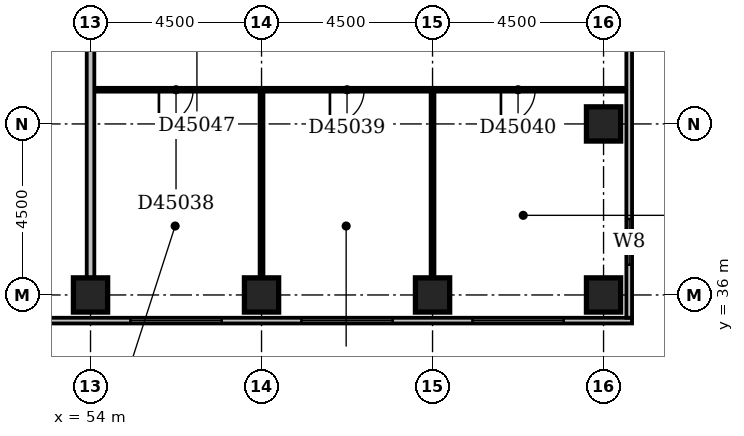
"""IFC4 building model, lengths in metres.
Left out: names, types, materials, properties, quantities, classifications, styles, units other than length and angle.
Written with IfcOpenShell. Run it as: python <this file> out.ifc"""

import sys

from ifc_helpers import new_model, si_unit, direction, frame, frame_2d, origin, origin_2d, place, context, subcontext, project, spatial, rectangle, extrude, element, fill, save


model = new_model("IFC4")
c1 = context("Model", 3, precision=1e-05, world=origin(), true_north=direction((0.0, 1.0)))
c2 = subcontext(c1, "Body", "Model", "MODEL_VIEW")
j1 = project(units=[si_unit("LENGTHUNIT", "METRE"), si_unit("PLANEANGLEUNIT", "RADIAN")], contexts=[c1])
p1 = place(None, origin())
s1 = spatial("IfcSite", under=j1, at=p1, CompositionType="ELEMENT")
p2 = place(p1, origin())
s2 = spatial("IfcBuilding", under=s1, at=p2, CompositionType="ELEMENT")
p3 = place(p2, frame((0.0, 0.0, 179.0)))
s3 = spatial("IfcBuildingStorey", under=s2, at=p3, CompositionType="ELEMENT", Elevation=179.0)
for number, where, z_axis, x_axis in (
    (1, (54.0, 36.0, -0.3), (0.0, 0.0, 1.0), (1.0, 0.0, 0.0)),
    (2, (58.5, 36.0, -0.3), (0.0, 0.0, 1.0), (1.0, 0.0, 0.0)),
    (3, (63.0, 36.0, -0.3), (0.0, 0.0, 1.0), (1.0, 0.0, 0.0)),
    (4, (67.5, 36.0, -0.3), (0.0, 0.0, 1.0), (1.0, 0.0, 0.0)),
    (5, (67.5, 40.5, -0.3), (0.0, 0.0, 1.0), (1.0, 0.0, 0.0)),
):
    element("IfcColumn", number, at=place(p3, frame(where, z_axis=z_axis, x_axis=x_axis)), inside=s3, PredefinedType="COLUMN", context=c2, shape_type="SweptSolid", body=[
        extrude(rectangle(XDim=0.9, YDim=0.9, at=origin_2d()), origin(), (0.0, 0.0, 1.0), 3.6),
    ])
p4 = place(p3, frame((23.1, 35.325, 0.0), z_axis=(0.0, 0.0, 1.0), x_axis=(1.0, 0.0, 0.0)))
e6 = element("IfcWall", 6, at=p4, inside=s3, PredefinedType="STANDARD", context=c2, shape_type="SweptSolid", body=[
    extrude(rectangle(XDim=45.15, YDim=0.15, at=frame_2d((22.575, 0.0))), origin(), (0.0, 0.0, 1.0), 2.7),
])
p5 = place(p4, frame((0.217, 0.0, 0.6)))
e7 = element("IfcOpeningElement", 7, at=p5, cuts=e6, PredefinedType="OPENING", context=c2, shape_type="SweptSolid", body=[
    extrude(rectangle(XDim=2.1, YDim=1.8, at=frame_2d((1.05, 0.9))), frame((0.0, 0.087, 0.0), z_axis=(0.0, -1.0, 0.0), x_axis=(1.0, 0.0, 0.0)), (0.0, 0.0, 1.0), 0.174),
])
p6 = place(p4, frame((4.95, 0.0, 0.6)))
e8 = element("IfcOpeningElement", 8, at=p6, cuts=e6, PredefinedType="OPENING", context=c2, shape_type="SweptSolid", body=[
    extrude(rectangle(XDim=2.4, YDim=1.8, at=frame_2d((1.2, 0.9))), frame((0.0, 0.087, 0.0), z_axis=(0.0, -1.0, 0.0), x_axis=(1.0, 0.0, 0.0)), (0.0, 0.0, 1.0), 0.174),
])
p7 = place(p4, frame((9.45, 0.0, 0.6)))
e9 = element("IfcOpeningElement", 9, at=p7, cuts=e6, PredefinedType="OPENING", context=c2, shape_type="SweptSolid", body=[
    extrude(rectangle(XDim=2.4, YDim=1.8, at=frame_2d((1.2, 0.9))), frame((0.0, 0.087, 0.0), z_axis=(0.0, -1.0, 0.0), x_axis=(1.0, 0.0, 0.0)), (0.0, 0.0, 1.0), 0.174),
])
p8 = place(p4, frame((13.95, 0.0, 0.6)))
e10 = element("IfcOpeningElement", 10, at=p8, cuts=e6, PredefinedType="OPENING", context=c2, shape_type="SweptSolid", body=[
    extrude(rectangle(XDim=2.4, YDim=1.8, at=frame_2d((1.2, 0.9))), frame((0.0, 0.087, 0.0), z_axis=(0.0, -1.0, 0.0), x_axis=(1.0, 0.0, 0.0)), (0.0, 0.0, 1.0), 0.174),
])
p9 = place(p4, frame((18.45, 0.0, 0.6)))
e11 = element("IfcOpeningElement", 11, at=p9, cuts=e6, PredefinedType="OPENING", context=c2, shape_type="SweptSolid", body=[
    extrude(rectangle(XDim=2.4, YDim=1.8, at=frame_2d((1.2, 0.9))), frame((0.0, 0.087, 0.0), z_axis=(0.0, -1.0, 0.0), x_axis=(1.0, 0.0, 0.0)), (0.0, 0.0, 1.0), 0.174),
])
p10 = place(p4, frame((24.403, 0.0, 0.6)))
e12 = element("IfcOpeningElement", 12, at=p10, cuts=e6, PredefinedType="OPENING", context=c2, shape_type="SweptSolid", body=[
    extrude(rectangle(XDim=1.2, YDim=1.8, at=frame_2d((0.6, 0.9))), frame((0.0, 0.087, 0.0), z_axis=(0.0, -1.0, 0.0), x_axis=(1.0, 0.0, 0.0)), (0.0, 0.0, 1.0), 0.174),
])
p11 = place(p4, frame((27.141, 0.0, 0.6)))
e13 = element("IfcOpeningElement", 13, at=p11, cuts=e6, PredefinedType="OPENING", context=c2, shape_type="SweptSolid", body=[
    extrude(rectangle(XDim=2.1, YDim=1.8, at=frame_2d((1.05, 0.9))), frame((0.0, 0.087, 0.0), z_axis=(0.0, -1.0, 0.0), x_axis=(1.0, 0.0, 0.0)), (0.0, 0.0, 1.0), 0.174),
])
p12 = place(p4, frame((31.95, 0.0, 0.6)))
e14 = element("IfcOpeningElement", 14, at=p12, cuts=e6, PredefinedType="OPENING", context=c2, shape_type="SweptSolid", body=[
    extrude(rectangle(XDim=2.4, YDim=1.8, at=frame_2d((1.2, 0.9))), frame((0.0, 0.087, 0.0), z_axis=(0.0, -1.0, 0.0), x_axis=(1.0, 0.0, 0.0)), (0.0, 0.0, 1.0), 0.174),
])
p13 = place(p4, frame((36.45, 0.0, 0.6)))
e15 = element("IfcOpeningElement", 15, at=p13, cuts=e6, PredefinedType="OPENING", context=c2, shape_type="SweptSolid", body=[
    extrude(rectangle(XDim=2.4, YDim=1.8, at=frame_2d((1.2, 0.9))), frame((0.0, 0.087, 0.0), z_axis=(0.0, -1.0, 0.0), x_axis=(1.0, 0.0, 0.0)), (0.0, 0.0, 1.0), 0.174),
])
p14 = place(p4, frame((40.95, 0.0, 0.6)))
e16 = element("IfcOpeningElement", 16, at=p14, cuts=e6, PredefinedType="OPENING", context=c2, shape_type="SweptSolid", body=[
    extrude(rectangle(XDim=2.4, YDim=1.8, at=frame_2d((1.2, 0.9))), frame((0.0, 0.087, 0.0), z_axis=(0.0, -1.0, 0.0), x_axis=(1.0, 0.0, 0.0)), (0.0, 0.0, 1.0), 0.174),
])
p15 = place(p3, frame((68.175, 35.4, 0.0), z_axis=(0.0, 0.0, 1.0), x_axis=(0.0, 1.0, 0.0)))
e17 = element("IfcWall", 17, at=p15, inside=s3, PredefinedType="STANDARD", context=c2, shape_type="SweptSolid", body=[
    extrude(rectangle(XDim=23.85, YDim=0.15, at=frame_2d((11.925, 0.0))), origin(), (0.0, 0.0, 1.0), 2.7),
])
p16 = place(p15, frame((1.397, 0.0, 0.6)))
e18 = element("IfcOpeningElement", 18, at=p16, cuts=e17, PredefinedType="OPENING", context=c2, shape_type="SweptSolid", body=[
    extrude(rectangle(XDim=1.2, YDim=1.8, at=frame_2d((0.6, 0.9))), frame((0.0, 0.087, 0.0), z_axis=(0.0, -1.0, 0.0), x_axis=(1.0, 0.0, 0.0)), (0.0, 0.0, 1.0), 0.174),
])
p17 = place(p15, frame((10.65, 0.0, 0.6)))
e19 = element("IfcOpeningElement", 19, at=p17, cuts=e17, PredefinedType="OPENING", context=c2, shape_type="SweptSolid", body=[
    extrude(rectangle(XDim=2.4, YDim=1.8, at=frame_2d((1.2, 0.9))), frame((0.0, 0.087, 0.0), z_axis=(0.0, -1.0, 0.0), x_axis=(1.0, 0.0, 0.0)), (0.0, 0.0, 1.0), 0.174),
])
p18 = place(p3, frame((54.0, 36.45, 0.0), z_axis=(0.0, 0.0, 1.0), x_axis=(0.0, 1.0, 0.0)))
e20 = element("IfcWall", 20, at=p18, inside=s3, PredefinedType="PARTITIONING", context=c2, shape_type="SweptSolid", body=[
    extrude(rectangle(XDim=12.95, YDim=0.2, at=frame_2d((6.475, 0.0))), origin(), (0.0, 0.0, 1.0), 2.6),
])
p19 = place(p3, frame((58.5, 36.45, 0.0), z_axis=(0.0, 0.0, 1.0), x_axis=(0.0, 1.0, 0.0)))
e21 = element("IfcWall", 21, at=p19, inside=s3, PredefinedType="PARTITIONING", context=c2, shape_type="SweptSolid", body=[
    extrude(rectangle(XDim=4.9, YDim=0.1, at=frame_2d((2.45, 0.0))), origin(), (0.0, 0.0, 1.0), 3.3),
])
p20 = place(p3, frame((63.0, 36.45, 0.0), z_axis=(0.0, 0.0, 1.0), x_axis=(0.0, 1.0, 0.0)))
e22 = element("IfcWall", 22, at=p20, inside=s3, PredefinedType="PARTITIONING", context=c2, shape_type="SweptSolid", body=[
    extrude(rectangle(XDim=4.9, YDim=0.1, at=frame_2d((2.45, 0.0))), origin(), (0.0, 0.0, 1.0), 2.4),
])
p21 = place(p3, frame((54.1, 41.4, 0.0), z_axis=(0.0, 0.0, 1.0), x_axis=(1.0, 0.0, 0.0)))
e23 = element("IfcWall", 23, at=p21, inside=s3, PredefinedType="PARTITIONING", context=c2, shape_type="SweptSolid", body=[
    extrude(rectangle(XDim=14.0, YDim=0.1, at=frame_2d((7.0, 0.0))), origin(), (0.0, 0.0, 1.0), 3.3),
])
p22 = place(p21, frame((1.7, 0.0, 0.0)))
e24 = element("IfcOpeningElement", 24, at=p22, cuts=e23, PredefinedType="OPENING", context=c2, shape_type="SweptSolid", body=[
    extrude(rectangle(XDim=0.9, YDim=2.1, at=frame_2d((0.45, 1.05))), frame((0.0, 0.062, 0.0), z_axis=(0.0, -1.0, 0.0), x_axis=(1.0, 0.0, 0.0)), (0.0, 0.0, 1.0), 0.124),
])
p23 = place(p21, frame((6.2, 0.0, 0.0)))
e25 = element("IfcOpeningElement", 25, at=p23, cuts=e23, PredefinedType="OPENING", context=c2, shape_type="SweptSolid", body=[
    extrude(rectangle(XDim=0.9, YDim=2.1, at=frame_2d((0.45, 1.05))), frame((0.0, 0.062, 0.0), z_axis=(0.0, -1.0, 0.0), x_axis=(1.0, 0.0, 0.0)), (0.0, 0.0, 1.0), 0.124),
])
p24 = place(p21, frame((10.7, 0.0, 0.0)))
e26 = element("IfcOpeningElement", 26, at=p24, cuts=e23, PredefinedType="OPENING", context=c2, shape_type="SweptSolid", body=[
    extrude(rectangle(XDim=0.9, YDim=2.1, at=frame_2d((0.45, 1.05))), frame((0.0, 0.062, 0.0), z_axis=(0.0, -1.0, 0.0), x_axis=(1.0, 0.0, 0.0)), (0.0, 0.0, 1.0), 0.124),
])
p25 = place(p12, origin())
e27 = element("IfcWindow", 27, at=p25, inside=s3, PartitioningType="SINGLE_PANEL", PredefinedType="WINDOW", context=c2, shape_type="SweptSolid", body=[
    extrude(rectangle(XDim=2.4, YDim=1.8, at=frame_2d((1.2, 0.9))), frame((0.0, 0.03, 0.0), z_axis=(0.0, -1.0, 0.0), x_axis=(1.0, 0.0, 0.0)), (0.0, 0.0, 1.0), 0.06),
])
fill(e14, e27)
p26 = place(p13, origin())
e28 = element("IfcWindow", 28, at=p26, inside=s3, PartitioningType="SINGLE_PANEL", PredefinedType="WINDOW", context=c2, shape_type="SweptSolid", body=[
    extrude(rectangle(XDim=2.4, YDim=1.8, at=frame_2d((1.2, 0.9))), frame((0.0, 0.03, 0.0), z_axis=(0.0, -1.0, 0.0), x_axis=(1.0, 0.0, 0.0)), (0.0, 0.0, 1.0), 0.06),
])
fill(e15, e28)
p27 = place(p14, origin())
e29 = element("IfcWindow", 29, at=p27, inside=s3, PartitioningType="SINGLE_PANEL", PredefinedType="WINDOW", context=c2, shape_type="SweptSolid", body=[
    extrude(rectangle(XDim=2.4, YDim=1.8, at=frame_2d((1.2, 0.9))), frame((0.0, 0.03, 0.0), z_axis=(0.0, -1.0, 0.0), x_axis=(1.0, 0.0, 0.0)), (0.0, 0.0, 1.0), 0.06),
])
fill(e16, e29)
p28 = place(p16, origin())
e30 = element("IfcWindow", 30, at=p28, inside=s3, PartitioningType="SINGLE_PANEL", PredefinedType="WINDOW", context=c2, shape_type="SweptSolid", body=[
    extrude(rectangle(XDim=1.2, YDim=1.8, at=frame_2d((0.6, 0.9))), frame((0.0, 0.03, 0.0), z_axis=(0.0, -1.0, 0.0), x_axis=(1.0, 0.0, 0.0)), (0.0, 0.0, 1.0), 0.06),
])
fill(e18, e30)
p29 = place(p22, frame((0.9, 0.0, 0.0), z_axis=(0.0, 0.0, 1.0), x_axis=(-1.0, 0.0, 0.0)))
e31 = element("IfcDoor", 31, at=p29, inside=s3, OperationType="SINGLE_SWING_RIGHT", PredefinedType="DOOR", context=c2, shape_type="SweptSolid", body=[
    extrude(rectangle(XDim=0.9, YDim=2.1, at=frame_2d((0.45, 1.05))), frame((0.0, 0.025, 0.0), z_axis=(0.0, -1.0, 0.0), x_axis=(1.0, 0.0, 0.0)), (0.0, 0.0, 1.0), 0.05),
])
fill(e24, e31)
p30 = place(p23, frame((0.9, 0.0, 0.0), z_axis=(0.0, 0.0, 1.0), x_axis=(-1.0, 0.0, 0.0)))
e32 = element("IfcDoor", 32, at=p30, inside=s3, OperationType="SINGLE_SWING_RIGHT", PredefinedType="DOOR", context=c2, shape_type="SweptSolid", body=[
    extrude(rectangle(XDim=0.9, YDim=2.1, at=frame_2d((0.45, 1.05))), frame((0.0, 0.025, 0.0), z_axis=(0.0, -1.0, 0.0), x_axis=(1.0, 0.0, 0.0)), (0.0, 0.0, 1.0), 0.05),
])
fill(e25, e32)
p31 = place(p24, frame((0.9, 0.0, 0.0), z_axis=(0.0, 0.0, 1.0), x_axis=(-1.0, 0.0, 0.0)))
e33 = element("IfcDoor", 33, at=p31, inside=s3, OperationType="SINGLE_SWING_RIGHT", PredefinedType="DOOR", context=c2, shape_type="SweptSolid", body=[
    extrude(rectangle(XDim=0.9, YDim=2.1, at=frame_2d((0.45, 1.05))), frame((0.0, 0.025, 0.0), z_axis=(0.0, -1.0, 0.0), x_axis=(1.0, 0.0, 0.0)), (0.0, 0.0, 1.0), 0.05),
])
fill(e26, e33)
save(model, sys.argv[1])
